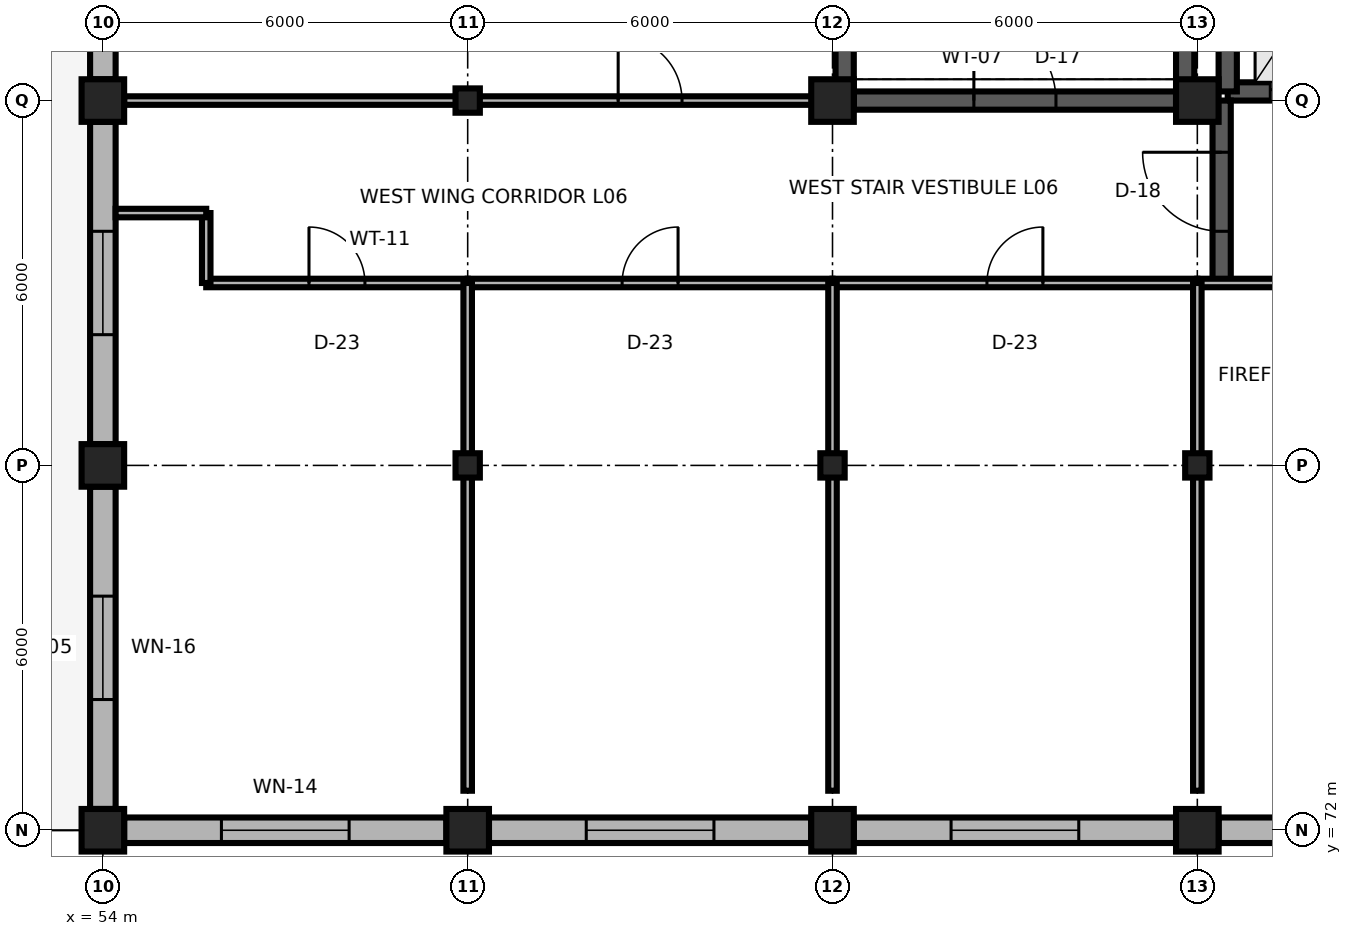
"""IFC4 building model, lengths in metres.
Left out: names, types, materials, properties, quantities, classifications, styles, units other than length and angle.
Written with IfcOpenShell. Run it as: python <this file> out.ifc"""

import sys

from ifc_helpers import new_model, si_unit, direction, frame, frame_2d, origin, origin_2d, place, context, subcontext, project, spatial, rectangle, i_section, extrude, element, fill, save


model = new_model("IFC4")
c1 = context("Model", 3, precision=1e-05, world=origin(), true_north=direction((0.0, 1.0)))
c2 = subcontext(c1, "Body", "Model", "MODEL_VIEW")
j1 = project(units=[si_unit("LENGTHUNIT", "METRE"), si_unit("PLANEANGLEUNIT", "RADIAN")], contexts=[c1])
p1 = place(None, origin())
s1 = spatial("IfcSite", under=j1, at=p1, CompositionType="ELEMENT")
p2 = place(p1, origin())
s2 = spatial("IfcBuilding", under=s1, at=p2, CompositionType="ELEMENT")
p3 = place(p2, frame((0.0, 0.0, 24.9)))
s3 = spatial("IfcBuildingStorey", under=s2, at=p3, CompositionType="ELEMENT", Elevation=24.9)
for number, where, z_axis, x_axis in (
    (1, (54.0, 72.0, 0.0), (0.0, 0.0, 1.0), (1.0, 0.0, 0.0)),
    (2, (60.0, 72.0, 0.0), (0.0, 0.0, 1.0), (1.0, 0.0, 0.0)),
    (3, (66.0, 72.0, 0.0), (0.0, 0.0, 1.0), (1.0, 0.0, 0.0)),
    (4, (72.0, 72.0, 0.0), (0.0, 0.0, 1.0), (1.0, 0.0, 0.0)),
    (5, (54.0, 78.0, 0.0), (0.0, 0.0, 1.0), (1.0, 0.0, 0.0)),
):
    element("IfcColumn", number, at=place(p3, frame(where, z_axis=z_axis, x_axis=x_axis)), inside=s3, PredefinedType="COLUMN", context=c2, shape_type="SweptSolid", body=[
        extrude(rectangle(XDim=0.7, YDim=0.7, at=origin_2d()), origin(), (0.0, 0.0, 1.0), 3.9),
    ])
for number, where, z_axis, x_axis in (
    (6, (60.0, 78.0, 0.0), (0.0, 0.0, 1.0), (1.0, 0.0, 0.0)),
    (7, (66.0, 78.0, 0.0), (0.0, 0.0, 1.0), (1.0, 0.0, 0.0)),
    (8, (72.0, 78.0, 0.0), (0.0, 0.0, 1.0), (1.0, 0.0, 0.0)),
):
    element("IfcColumn", number, at=place(p3, frame(where, z_axis=z_axis, x_axis=x_axis)), inside=s3, PredefinedType="COLUMN", context=c2, shape_type="SweptSolid", body=[
        extrude(i_section(OverallWidth=0.4, OverallDepth=0.4, WebThickness=0.013, FlangeThickness=0.021, FilletRadius=0.022, at=origin_2d()), origin(), (0.0, 0.0, 1.0), 3.9),
    ])
p4 = place(p3, frame((54.0, 84.0, 0.0), z_axis=(0.0, 0.0, 1.0), x_axis=(1.0, 0.0, 0.0)))
e9 = element("IfcColumn", 9, at=p4, inside=s3, PredefinedType="COLUMN", context=c2, shape_type="SweptSolid", body=[
    extrude(rectangle(XDim=0.7, YDim=0.7, at=origin_2d()), origin(), (0.0, 0.0, 1.0), 3.9),
])
p5 = place(p3, frame((60.0, 84.0, 0.0), z_axis=(0.0, 0.0, 1.0), x_axis=(1.0, 0.0, 0.0)))
e10 = element("IfcColumn", 10, at=p5, inside=s3, PredefinedType="COLUMN", context=c2, shape_type="SweptSolid", body=[
    extrude(i_section(OverallWidth=0.4, OverallDepth=0.4, WebThickness=0.013, FlangeThickness=0.021, FilletRadius=0.022, at=origin_2d()), origin(), (0.0, 0.0, 1.0), 3.9),
])
for number, where, z_axis, x_axis in (
    (11, (66.0, 84.0, 0.0), (0.0, 0.0, 1.0), (1.0, 0.0, 0.0)),
    (12, (72.0, 84.0, 0.0), (0.0, 0.0, 1.0), (1.0, 0.0, 0.0)),
):
    element("IfcColumn", number, at=place(p3, frame(where, z_axis=z_axis, x_axis=x_axis)), inside=s3, PredefinedType="COLUMN", context=c2, shape_type="SweptSolid", body=[
        extrude(rectangle(XDim=0.7, YDim=0.7, at=origin_2d()), origin(), (0.0, 0.0, 1.0), 3.9),
    ])
p6 = place(p3, frame((54.35, 72.0, 0.0), z_axis=(0.0, 0.0, 1.0), x_axis=(1.0, 0.0, 0.0)))
e13 = element("IfcWall", 13, at=p6, inside=s3, PredefinedType="SOLIDWALL", context=c2, shape_type="SweptSolid", body=[
    extrude(rectangle(XDim=5.3, YDim=0.42, at=frame_2d((2.65, 0.0))), origin(), (0.0, 0.0, 1.0), 3.32),
])
p7 = place(p6, frame((1.6, 0.0, 0.85)))
e14 = element("IfcOpeningElement", 14, at=p7, cuts=e13, PredefinedType="OPENING", context=c2, shape_type="SweptSolid", body=[
    extrude(rectangle(XDim=2.1, YDim=2.1, at=frame_2d((1.05, 1.05))), frame((0.0, 0.225, 0.0), z_axis=(0.0, -1.0, 0.0), x_axis=(1.0, 0.0, 0.0)), (0.0, 0.0, 1.0), 0.45),
])
p8 = place(p3, frame((60.35, 72.0, 0.0), z_axis=(0.0, 0.0, 1.0), x_axis=(1.0, 0.0, 0.0)))
e15 = element("IfcWall", 15, at=p8, inside=s3, PredefinedType="SOLIDWALL", context=c2, shape_type="SweptSolid", body=[
    extrude(rectangle(XDim=5.3, YDim=0.42, at=frame_2d((2.65, 0.0))), origin(), (0.0, 0.0, 1.0), 3.32),
])
p9 = place(p8, frame((1.6, 0.0, 0.85)))
e16 = element("IfcOpeningElement", 16, at=p9, cuts=e15, PredefinedType="OPENING", context=c2, shape_type="SweptSolid", body=[
    extrude(rectangle(XDim=2.1, YDim=2.1, at=frame_2d((1.05, 1.05))), frame((0.0, 0.225, 0.0), z_axis=(0.0, -1.0, 0.0), x_axis=(1.0, 0.0, 0.0)), (0.0, 0.0, 1.0), 0.45),
])
p10 = place(p3, frame((66.35, 72.0, 0.0), z_axis=(0.0, 0.0, 1.0), x_axis=(1.0, 0.0, 0.0)))
e17 = element("IfcWall", 17, at=p10, inside=s3, PredefinedType="SOLIDWALL", context=c2, shape_type="SweptSolid", body=[
    extrude(rectangle(XDim=5.3, YDim=0.42, at=frame_2d((2.65, 0.0))), origin(), (0.0, 0.0, 1.0), 3.32),
])
p11 = place(p10, frame((1.6, 0.0, 0.85)))
e18 = element("IfcOpeningElement", 18, at=p11, cuts=e17, PredefinedType="OPENING", context=c2, shape_type="SweptSolid", body=[
    extrude(rectangle(XDim=2.1, YDim=2.1, at=frame_2d((1.05, 1.05))), frame((0.0, 0.225, 0.0), z_axis=(0.0, -1.0, 0.0), x_axis=(1.0, 0.0, 0.0)), (0.0, 0.0, 1.0), 0.45),
])
p12 = place(p3, frame((72.35, 72.0, 0.0), z_axis=(0.0, 0.0, 1.0), x_axis=(1.0, 0.0, 0.0)))
e19 = element("IfcWall", 19, at=p12, inside=s3, PredefinedType="SOLIDWALL", context=c2, shape_type="SweptSolid", body=[
    extrude(rectangle(XDim=5.3, YDim=0.42, at=frame_2d((2.65, 0.0))), origin(), (0.0, 0.0, 1.0), 3.32),
])
p13 = place(p12, frame((1.6, 0.0, 0.85)))
e20 = element("IfcOpeningElement", 20, at=p13, cuts=e19, PredefinedType="OPENING", context=c2, shape_type="SweptSolid", body=[
    extrude(rectangle(XDim=2.1, YDim=2.1, at=frame_2d((1.05, 1.05))), frame((0.0, 0.225, 0.0), z_axis=(0.0, -1.0, 0.0), x_axis=(1.0, 0.0, 0.0)), (0.0, 0.0, 1.0), 0.45),
])
p14 = place(p3, frame((54.0, 72.35, 0.0), z_axis=(0.0, 0.0, 1.0), x_axis=(0.0, 1.0, 0.0)))
e21 = element("IfcWall", 21, at=p14, inside=s3, PredefinedType="SOLIDWALL", context=c2, shape_type="SweptSolid", body=[
    extrude(rectangle(XDim=5.3, YDim=0.42, at=frame_2d((2.65, 0.0))), origin(), (0.0, 0.0, 1.0), 3.32),
])
p15 = place(p14, frame((1.8, 0.0, 0.85)))
e22 = element("IfcOpeningElement", 22, at=p15, cuts=e21, PredefinedType="OPENING", context=c2, shape_type="SweptSolid", body=[
    extrude(rectangle(XDim=1.7, YDim=2.05, at=frame_2d((0.85, 1.025))), frame((0.0, 0.225, 0.0), z_axis=(0.0, -1.0, 0.0), x_axis=(1.0, 0.0, 0.0)), (0.0, 0.0, 1.0), 0.45),
])
p16 = place(p3, frame((54.0, 78.35, 0.0), z_axis=(0.0, 0.0, 1.0), x_axis=(0.0, 1.0, 0.0)))
e23 = element("IfcWall", 23, at=p16, inside=s3, PredefinedType="SOLIDWALL", context=c2, shape_type="SweptSolid", body=[
    extrude(rectangle(XDim=5.3, YDim=0.42, at=frame_2d((2.65, 0.0))), origin(), (0.0, 0.0, 1.0), 3.32),
])
p17 = place(p16, frame((1.8, 0.0, 0.85)))
e24 = element("IfcOpeningElement", 24, at=p17, cuts=e23, PredefinedType="OPENING", context=c2, shape_type="SweptSolid", body=[
    extrude(rectangle(XDim=1.7, YDim=2.05, at=frame_2d((0.85, 1.025))), frame((0.0, 0.225, 0.0), z_axis=(0.0, -1.0, 0.0), x_axis=(1.0, 0.0, 0.0)), (0.0, 0.0, 1.0), 0.45),
])
p18 = place(p3, frame((54.0, 84.35, 0.0), z_axis=(0.0, 0.0, 1.0), x_axis=(0.0, 1.0, 0.0)))
e25 = element("IfcWall", 25, at=p18, inside=s3, PredefinedType="SOLIDWALL", context=c2, shape_type="SweptSolid", body=[
    extrude(rectangle(XDim=5.3, YDim=0.42, at=frame_2d((2.65, 0.0))), origin(), (0.0, 0.0, 1.0), 3.32),
])
p19 = place(p18, frame((1.8, 0.0, 0.85)))
e26 = element("IfcOpeningElement", 26, at=p19, cuts=e25, PredefinedType="OPENING", context=c2, shape_type="SweptSolid", body=[
    extrude(rectangle(XDim=1.7, YDim=2.05, at=frame_2d((0.85, 1.025))), frame((0.0, 0.225, 0.0), z_axis=(0.0, -1.0, 0.0), x_axis=(1.0, 0.0, 0.0)), (0.0, 0.0, 1.0), 0.45),
])
p20 = place(p3, frame((66.35, 84.0, 0.0), z_axis=(0.0, 0.0, 1.0), x_axis=(1.0, 0.0, 0.0)))
e27 = element("IfcWall", 27, at=p20, inside=s3, PredefinedType="SHEAR", context=c2, shape_type="SweptSolid", body=[
    extrude(rectangle(XDim=5.3, YDim=0.3, at=frame_2d((2.65, 0.0))), origin(), (0.0, 0.0, 1.0), 3.66),
])
p21 = place(p20, frame((1.975, 0.0, 0.0)))
e28 = element("IfcOpeningElement", 28, at=p21, cuts=e27, PredefinedType="OPENING", context=c2, shape_type="SweptSolid", body=[
    extrude(rectangle(XDim=1.35, YDim=2.2, at=frame_2d((0.675, 1.1))), frame((0.0, 0.165, 0.0), z_axis=(0.0, -1.0, 0.0), x_axis=(1.0, 0.0, 0.0)), (0.0, 0.0, 1.0), 0.33),
])
for number, where, z_axis, x_axis in (
    (29, (66.2, 84.0, 0.0), (0.0, 0.0, 1.0), (0.0, 1.0, 0.0)),
    (30, (71.8, 84.0, 0.0), (0.0, 0.0, 1.0), (0.0, 1.0, 0.0)),
):
    element("IfcWall", number, at=place(p3, frame(where, z_axis=z_axis, x_axis=x_axis)), inside=s3, PredefinedType="SHEAR", context=c2, shape_type="SweptSolid", body=[
        extrude(rectangle(XDim=11.8, YDim=0.3, at=frame_2d((5.9, 0.0))), origin(), (0.0, 0.0, 1.0), 3.74),
    ])
p22 = place(p3, frame((72.5, 84.15, 0.0), z_axis=(0.0, 0.0, 1.0), x_axis=(1.0, 0.0, 0.0)))
e31 = element("IfcWall", 31, at=p22, inside=s3, PredefinedType="SHEAR", context=c2, shape_type="SweptSolid", body=[
    extrude(rectangle(XDim=2.5, YDim=0.3, at=frame_2d((1.25, 0.0))), origin(), (0.0, 0.0, 1.0), 3.74),
])
p23 = place(p22, frame((0.7, 0.0, 0.0)))
e32 = element("IfcOpeningElement", 32, at=p23, cuts=e31, PredefinedType="OPENING", context=c2, shape_type="SweptSolid", body=[
    extrude(rectangle(XDim=1.1, YDim=2.1, at=frame_2d((0.55, 1.05))), frame((0.0, 0.165, 0.0), z_axis=(0.0, -1.0, 0.0), x_axis=(1.0, 0.0, 0.0)), (0.0, 0.0, 1.0), 0.33),
])
p24 = place(p3, frame((72.5, 84.15, 0.0), z_axis=(0.0, 0.0, 1.0), x_axis=(0.0, 1.0, 0.0)))
e33 = element("IfcWall", 33, at=p24, inside=s3, PredefinedType="SHEAR", context=c2, shape_type="SweptSolid", body=[
    extrude(rectangle(XDim=3.4, YDim=0.3, at=frame_2d((1.7, 0.0))), origin(), (0.0, 0.0, 1.0), 3.74),
])
p25 = place(p3, frame((72.4, 81.0, 0.0), z_axis=(0.0, 0.0, 1.0), x_axis=(0.0, 1.0, 0.0)))
e34 = element("IfcWall", 34, at=p25, inside=s3, PredefinedType="SHEAR", context=c2, shape_type="SweptSolid", body=[
    extrude(rectangle(XDim=3.0, YDim=0.3, at=frame_2d((1.5, 0.0))), origin(), (0.0, 0.0, 1.0), 3.74),
])
p26 = place(p25, frame((0.85, 0.0, 0.0)))
e35 = element("IfcOpeningElement", 35, at=p26, cuts=e34, PredefinedType="OPENING", context=c2, shape_type="SweptSolid", body=[
    extrude(rectangle(XDim=1.3, YDim=2.2, at=frame_2d((0.65, 1.1))), frame((0.0, 0.165, 0.0), z_axis=(0.0, -1.0, 0.0), x_axis=(1.0, 0.0, 0.0)), (0.0, 0.0, 1.0), 0.33),
])
p27 = place(p3, frame((55.7, 81.0, 0.0), z_axis=(0.0, 0.0, 1.0), x_axis=(1.0, 0.0, 0.0)))
e36 = element("IfcWall", 36, at=p27, inside=s3, PredefinedType="PARTITIONING", context=c2, shape_type="SweptSolid", body=[
    extrude(rectangle(XDim=4.3, YDim=0.14, at=frame_2d((2.15, 0.0))), origin(), (0.0, 0.0, 1.0), 3.74),
])
p28 = place(p27, frame((1.69, 0.0, 0.0)))
e37 = element("IfcOpeningElement", 37, at=p28, cuts=e36, PredefinedType="OPENING", context=c2, shape_type="SweptSolid", body=[
    extrude(rectangle(XDim=0.92, YDim=2.15, at=frame_2d((0.46, 1.075))), frame((0.0, 0.085, 0.0), z_axis=(0.0, -1.0, 0.0), x_axis=(1.0, 0.0, 0.0)), (0.0, 0.0, 1.0), 0.17),
])
p29 = place(p3, frame((60.0, 81.0, 0.0), z_axis=(0.0, 0.0, 1.0), x_axis=(1.0, 0.0, 0.0)))
e38 = element("IfcWall", 38, at=p29, inside=s3, PredefinedType="PARTITIONING", context=c2, shape_type="SweptSolid", body=[
    extrude(rectangle(XDim=6.0, YDim=0.14, at=frame_2d((3.0, 0.0))), origin(), (0.0, 0.0, 1.0), 3.74),
])
p30 = place(p29, frame((2.54, 0.0, 0.0)))
e39 = element("IfcOpeningElement", 39, at=p30, cuts=e38, PredefinedType="OPENING", context=c2, shape_type="SweptSolid", body=[
    extrude(rectangle(XDim=0.92, YDim=2.15, at=frame_2d((0.46, 1.075))), frame((0.0, 0.085, 0.0), z_axis=(0.0, -1.0, 0.0), x_axis=(1.0, 0.0, 0.0)), (0.0, 0.0, 1.0), 0.17),
])
p31 = place(p3, frame((66.0, 81.0, 0.0), z_axis=(0.0, 0.0, 1.0), x_axis=(1.0, 0.0, 0.0)))
e40 = element("IfcWall", 40, at=p31, inside=s3, PredefinedType="PARTITIONING", context=c2, shape_type="SweptSolid", body=[
    extrude(rectangle(XDim=6.0, YDim=0.14, at=frame_2d((3.0, 0.0))), origin(), (0.0, 0.0, 1.0), 3.74),
])
p32 = place(p31, frame((2.54, 0.0, 0.0)))
e41 = element("IfcOpeningElement", 41, at=p32, cuts=e40, PredefinedType="OPENING", context=c2, shape_type="SweptSolid", body=[
    extrude(rectangle(XDim=0.92, YDim=2.15, at=frame_2d((0.46, 1.075))), frame((0.0, 0.085, 0.0), z_axis=(0.0, -1.0, 0.0), x_axis=(1.0, 0.0, 0.0)), (0.0, 0.0, 1.0), 0.17),
])
p33 = place(p3, frame((72.0, 81.0, 0.0), z_axis=(0.0, 0.0, 1.0), x_axis=(1.0, 0.0, 0.0)))
e42 = element("IfcWall", 42, at=p33, inside=s3, PredefinedType="PARTITIONING", context=c2, shape_type="SweptSolid", body=[
    extrude(rectangle(XDim=6.0, YDim=0.14, at=frame_2d((3.0, 0.0))), origin(), (0.0, 0.0, 1.0), 3.74),
])
p34 = place(p33, frame((2.54, 0.0, 0.0)))
e43 = element("IfcOpeningElement", 43, at=p34, cuts=e42, PredefinedType="OPENING", context=c2, shape_type="SweptSolid", body=[
    extrude(rectangle(XDim=0.92, YDim=2.15, at=frame_2d((0.46, 1.075))), frame((0.0, 0.085, 0.0), z_axis=(0.0, -1.0, 0.0), x_axis=(1.0, 0.0, 0.0)), (0.0, 0.0, 1.0), 0.17),
])
p35 = place(p3, frame((60.0, 84.0, 0.0), z_axis=(0.0, 0.0, 1.0), x_axis=(1.0, 0.0, 0.0)))
e44 = element("IfcWall", 44, at=p35, inside=s3, PredefinedType="PARTITIONING", context=c2, shape_type="SweptSolid", body=[
    extrude(rectangle(XDim=6.0, YDim=0.14, at=frame_2d((3.0, 0.0))), origin(), (0.0, 0.0, 1.0), 3.352),
])
p36 = place(p35, frame((2.475, 0.0, 0.0)))
e45 = element("IfcOpeningElement", 45, at=p36, cuts=e44, PredefinedType="OPENING", context=c2, shape_type="SweptSolid", body=[
    extrude(rectangle(XDim=1.05, YDim=2.25, at=frame_2d((0.525, 1.125))), frame((0.0, 0.085, 0.0), z_axis=(0.0, -1.0, 0.0), x_axis=(1.0, 0.0, 0.0)), (0.0, 0.0, 1.0), 0.17),
])
for number, where, z_axis, x_axis in (
    (46, (60.0, 72.65, 0.0), (0.0, 0.0, 1.0), (0.0, 1.0, 0.0)),
    (47, (66.0, 72.65, 0.0), (0.0, 0.0, 1.0), (0.0, 1.0, 0.0)),
    (48, (72.0, 72.65, 0.0), (0.0, 0.0, 1.0), (0.0, 1.0, 0.0)),
):
    element("IfcWall", number, at=place(p3, frame(where, z_axis=z_axis, x_axis=x_axis)), inside=s3, PredefinedType="PARTITIONING", context=c2, shape_type="SweptSolid", body=[
        extrude(rectangle(XDim=8.35, YDim=0.14, at=frame_2d((4.175, 0.0))), origin(), (0.0, 0.0, 1.0), 3.352),
    ])
p37 = place(p3, frame((55.7, 81.0, 0.0), z_axis=(0.0, 0.0, 1.0), x_axis=(0.0, 1.0, 0.0)))
e49 = element("IfcWall", 49, at=p37, inside=s3, PredefinedType="PARTITIONING", context=c2, shape_type="SweptSolid", body=[
    extrude(rectangle(XDim=1.15, YDim=0.14, at=frame_2d((0.575, 0.0))), origin(), (0.0, 0.0, 1.0), 3.74),
])
p38 = place(p3, frame((55.7, 82.15, 0.0), z_axis=(0.0, 0.0, 1.0), x_axis=(-1.0, 0.0, 0.0)))
e50 = element("IfcWall", 50, at=p38, inside=s3, PredefinedType="PARTITIONING", context=c2, shape_type="SweptSolid", body=[
    extrude(rectangle(XDim=1.49, YDim=0.14, at=frame_2d((0.745, 0.0))), origin(), (0.0, 0.0, 1.0), 3.74),
])
p39 = place(p3, frame((54.35, 84.0, 0.0), z_axis=(0.0, 0.0, 1.0), x_axis=(1.0, 0.0, 0.0)))
e51 = element("IfcWall", 51, at=p39, inside=s3, PredefinedType="PARTITIONING", context=c2, shape_type="SweptSolid", body=[
    extrude(rectangle(XDim=5.65, YDim=0.14, at=frame_2d((2.825, 0.0))), origin(), (0.0, 0.0, 1.0), 3.352),
])
p40 = place(p7, origin())
e52 = element("IfcWindow", 52, at=p40, inside=s3, PartitioningType="SINGLE_PANEL", PredefinedType="WINDOW", context=c2, shape_type="SweptSolid", body=[
    extrude(rectangle(XDim=2.1, YDim=2.1, at=frame_2d((1.05, 1.05))), frame((0.0, 0.03, 0.0), z_axis=(0.0, -1.0, 0.0), x_axis=(1.0, 0.0, 0.0)), (0.0, 0.0, 1.0), 0.06),
])
fill(e14, e52)
p41 = place(p9, origin())
e53 = element("IfcWindow", 53, at=p41, inside=s3, PartitioningType="SINGLE_PANEL", PredefinedType="WINDOW", context=c2, shape_type="SweptSolid", body=[
    extrude(rectangle(XDim=2.1, YDim=2.1, at=frame_2d((1.05, 1.05))), frame((0.0, 0.03, 0.0), z_axis=(0.0, -1.0, 0.0), x_axis=(1.0, 0.0, 0.0)), (0.0, 0.0, 1.0), 0.06),
])
fill(e16, e53)
p42 = place(p11, origin())
e54 = element("IfcWindow", 54, at=p42, inside=s3, PartitioningType="SINGLE_PANEL", PredefinedType="WINDOW", context=c2, shape_type="SweptSolid", body=[
    extrude(rectangle(XDim=2.1, YDim=2.1, at=frame_2d((1.05, 1.05))), frame((0.0, 0.03, 0.0), z_axis=(0.0, -1.0, 0.0), x_axis=(1.0, 0.0, 0.0)), (0.0, 0.0, 1.0), 0.06),
])
fill(e18, e54)
p43 = place(p15, origin())
e55 = element("IfcWindow", 55, at=p43, inside=s3, PartitioningType="SINGLE_PANEL", PredefinedType="WINDOW", context=c2, shape_type="SweptSolid", body=[
    extrude(rectangle(XDim=1.7, YDim=2.05, at=frame_2d((0.85, 1.025))), frame((0.0, 0.03, 0.0), z_axis=(0.0, -1.0, 0.0), x_axis=(1.0, 0.0, 0.0)), (0.0, 0.0, 1.0), 0.06),
])
fill(e22, e55)
p44 = place(p17, origin())
e56 = element("IfcWindow", 56, at=p44, inside=s3, PartitioningType="SINGLE_PANEL", PredefinedType="WINDOW", context=c2, shape_type="SweptSolid", body=[
    extrude(rectangle(XDim=1.7, YDim=2.05, at=frame_2d((0.85, 1.025))), frame((0.0, 0.03, 0.0), z_axis=(0.0, -1.0, 0.0), x_axis=(1.0, 0.0, 0.0)), (0.0, 0.0, 1.0), 0.06),
])
fill(e24, e56)
p45 = place(p21, origin())
e57 = element("IfcDoor", 57, at=p45, inside=s3, OperationType="SINGLE_SWING_LEFT", PredefinedType="DOOR", context=c2, shape_type="SweptSolid", body=[
    extrude(rectangle(XDim=1.35, YDim=2.2, at=frame_2d((0.675, 1.1))), frame((0.0, 0.025, 0.0), z_axis=(0.0, -1.0, 0.0), x_axis=(1.0, 0.0, 0.0)), (0.0, 0.0, 1.0), 0.05),
])
fill(e28, e57)
p46 = place(p23, origin())
e58 = element("IfcDoor", 58, at=p46, inside=s3, OperationType="DOUBLE_DOOR_SLIDING", PredefinedType="DOOR", context=c2, shape_type="SweptSolid", body=[
    extrude(rectangle(XDim=1.1, YDim=2.1, at=frame_2d((0.55, 1.05))), frame((0.0, 0.025, 0.0), z_axis=(0.0, -1.0, 0.0), x_axis=(1.0, 0.0, 0.0)), (0.0, 0.0, 1.0), 0.05),
])
fill(e32, e58)
p47 = place(p26, origin())
e59 = element("IfcDoor", 59, at=p47, inside=s3, OperationType="SINGLE_SWING_RIGHT", PredefinedType="DOOR", context=c2, shape_type="SweptSolid", body=[
    extrude(rectangle(XDim=1.3, YDim=2.2, at=frame_2d((0.65, 1.1))), frame((0.0, 0.025, 0.0), z_axis=(0.0, -1.0, 0.0), x_axis=(1.0, 0.0, 0.0)), (0.0, 0.0, 1.0), 0.05),
])
fill(e35, e59)
p48 = place(p28, origin())
e60 = element("IfcDoor", 60, at=p48, inside=s3, OperationType="SINGLE_SWING_LEFT", PredefinedType="DOOR", context=c2, shape_type="SweptSolid", body=[
    extrude(rectangle(XDim=0.92, YDim=2.15, at=frame_2d((0.46, 1.075))), frame((0.0, 0.025, 0.0), z_axis=(0.0, -1.0, 0.0), x_axis=(1.0, 0.0, 0.0)), (0.0, 0.0, 1.0), 0.05),
])
fill(e37, e60)
p49 = place(p30, origin())
e61 = element("IfcDoor", 61, at=p49, inside=s3, OperationType="SINGLE_SWING_RIGHT", PredefinedType="DOOR", context=c2, shape_type="SweptSolid", body=[
    extrude(rectangle(XDim=0.92, YDim=2.15, at=frame_2d((0.46, 1.075))), frame((0.0, 0.025, 0.0), z_axis=(0.0, -1.0, 0.0), x_axis=(1.0, 0.0, 0.0)), (0.0, 0.0, 1.0), 0.05),
])
fill(e39, e61)
p50 = place(p32, origin())
e62 = element("IfcDoor", 62, at=p50, inside=s3, OperationType="SINGLE_SWING_RIGHT", PredefinedType="DOOR", context=c2, shape_type="SweptSolid", body=[
    extrude(rectangle(XDim=0.92, YDim=2.15, at=frame_2d((0.46, 1.075))), frame((0.0, 0.025, 0.0), z_axis=(0.0, -1.0, 0.0), x_axis=(1.0, 0.0, 0.0)), (0.0, 0.0, 1.0), 0.05),
])
fill(e41, e62)
p51 = place(p36, origin())
e63 = element("IfcDoor", 63, at=p51, inside=s3, OperationType="SINGLE_SWING_LEFT", PredefinedType="DOOR", context=c2, shape_type="SweptSolid", body=[
    extrude(rectangle(XDim=1.05, YDim=2.25, at=frame_2d((0.525, 1.125))), frame((0.0, 0.025, 0.0), z_axis=(0.0, -1.0, 0.0), x_axis=(1.0, 0.0, 0.0)), (0.0, 0.0, 1.0), 0.05),
])
fill(e45, e63)
save(model, sys.argv[1])
